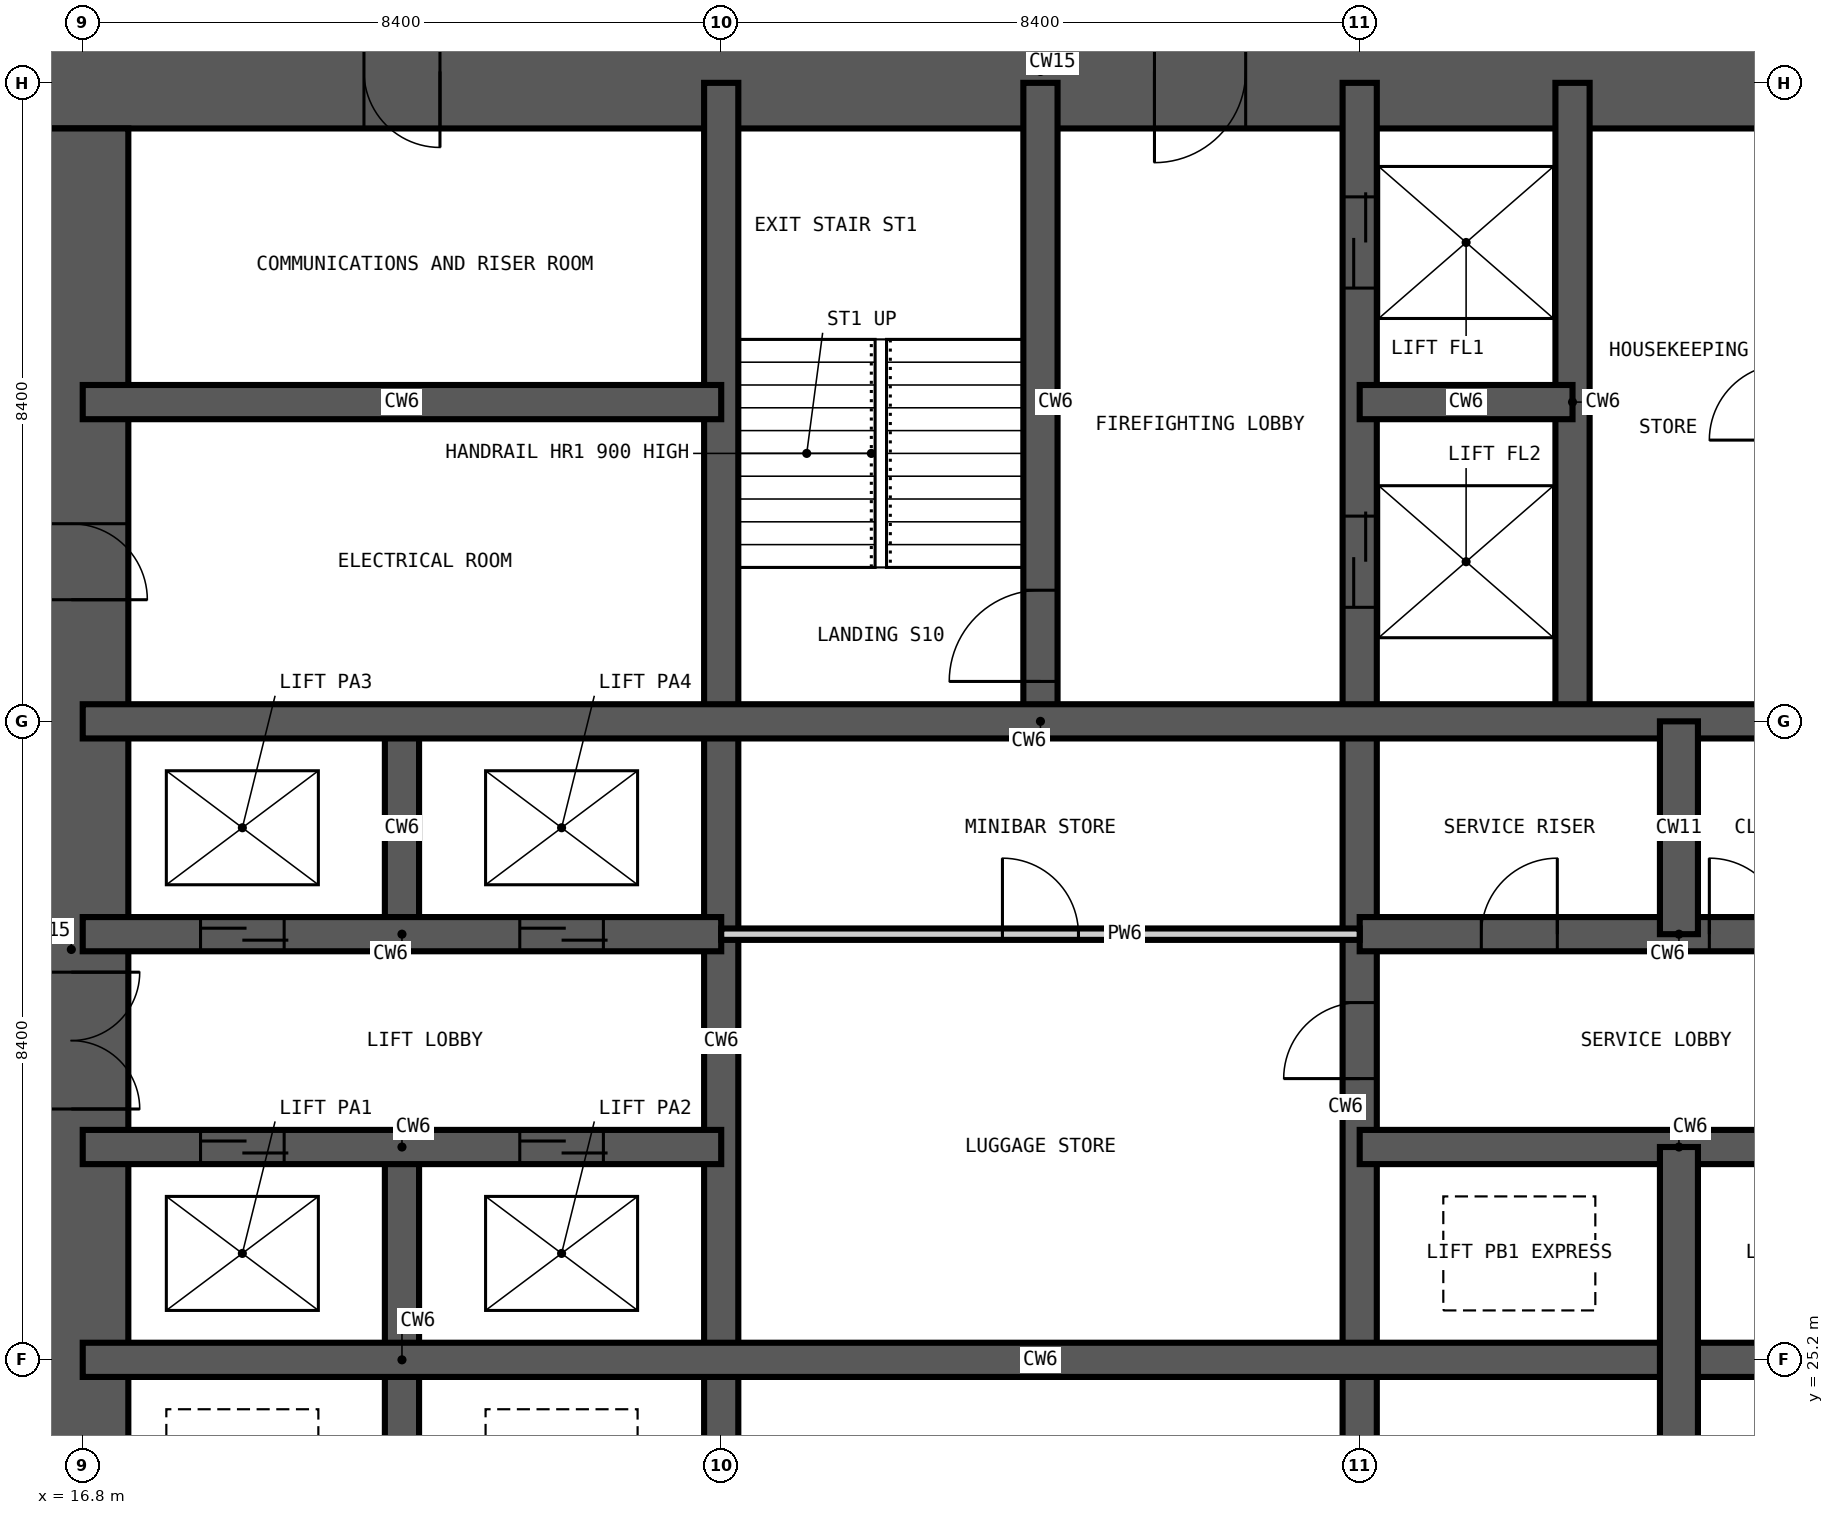
"""IFC4 building model, lengths in metres.
Left out: names, types, materials, properties, quantities, classifications, styles, units other than length and angle.
Written with IfcOpenShell. Run it as: python <this file> out.ifc"""

import sys

from ifc_helpers import new_model, si_unit, direction, frame, frame_2d, origin, place, context, subcontext, project, spatial, rectangle, extrude, element, fill, save


model = new_model("IFC4")
c1 = context("Model", 3, precision=1e-05, world=origin(), true_north=direction((0.0, 1.0)))
c2 = subcontext(c1, "Body", "Model", "MODEL_VIEW")
j1 = project(units=[si_unit("LENGTHUNIT", "METRE"), si_unit("PLANEANGLEUNIT", "RADIAN")], contexts=[c1])
p1 = place(None, origin())
s1 = spatial("IfcSite", under=j1, at=p1, CompositionType="ELEMENT")
p2 = place(p1, origin())
s2 = spatial("IfcBuilding", under=s1, at=p2, CompositionType="ELEMENT")
p3 = place(p2, frame((0.0, 0.0, 84.6)))
s3 = spatial("IfcBuildingStorey", under=s2, at=p3, CompositionType="ELEMENT", Elevation=84.6)
p4 = place(p3, frame((42.9, 42.15, -0.35), z_axis=(0.0, 0.0, 1.0), x_axis=(-1.0, 0.0, 0.0)))
e1 = element("IfcWall", 1, at=p4, inside=s3, PredefinedType="SHEAR", context=c2, shape_type="SweptSolid", body=[
    extrude(rectangle(XDim=27.0, YDim=1.5, at=frame_2d((13.5, 0.0))), origin(), (0.0, 0.0, 1.0), 3.55),
])
p5 = place(p4, frame((21.4, 0.0, 0.35)))
e2 = element("IfcOpeningElement", 2, at=p5, cuts=e1, PredefinedType="OPENING", context=c2, shape_type="SweptSolid", body=[
    extrude(rectangle(XDim=1.0, YDim=2.1, at=frame_2d((0.5, 1.05))), frame((0.0, 0.76, 0.0), z_axis=(0.0, -1.0, 0.0), x_axis=(1.0, 0.0, 0.0)), (0.0, 0.0, 1.0), 1.52),
])
p6 = place(p4, frame((10.8, 0.0, 0.35)))
e3 = element("IfcOpeningElement", 3, at=p6, cuts=e1, PredefinedType="OPENING", context=c2, shape_type="SweptSolid", body=[
    extrude(rectangle(XDim=1.2, YDim=2.2, at=frame_2d((0.6, 1.1))), frame((0.0, 0.76, 0.0), z_axis=(0.0, -1.0, 0.0), x_axis=(1.0, 0.0, 0.0)), (0.0, 0.0, 1.0), 1.52),
])
p7 = place(p3, frame((16.65, 41.4, -0.35), z_axis=(0.0, 0.0, 1.0), x_axis=(0.0, -1.0, 0.0)))
e4 = element("IfcWall", 4, at=p7, inside=s3, PredefinedType="SHEAR", context=c2, shape_type="SweptSolid", body=[
    extrude(rectangle(XDim=24.0, YDim=1.5, at=frame_2d((12.0, 0.0))), origin(), (0.0, 0.0, 1.0), 3.55),
])
p8 = place(p7, frame((11.1, 0.0, 0.35)))
e5 = element("IfcOpeningElement", 5, at=p8, cuts=e4, PredefinedType="OPENING", context=c2, shape_type="SweptSolid", body=[
    extrude(rectangle(XDim=1.8, YDim=2.2, at=frame_2d((0.9, 1.1))), frame((0.0, 0.76, 0.0), z_axis=(0.0, -1.0, 0.0), x_axis=(1.0, 0.0, 0.0)), (0.0, 0.0, 1.0), 1.52),
])
p9 = place(p7, frame((19.9, 0.0, 0.35)))
e6 = element("IfcOpeningElement", 6, at=p9, cuts=e4, PredefinedType="OPENING", context=c2, shape_type="SweptSolid", body=[
    extrude(rectangle(XDim=1.0, YDim=2.1, at=frame_2d((0.5, 1.05))), frame((0.0, 0.76, 0.0), z_axis=(0.0, -1.0, 0.0), x_axis=(1.0, 0.0, 0.0)), (0.0, 0.0, 1.0), 1.52),
])
p10 = place(p7, frame((5.2, 0.0, 0.35)))
e7 = element("IfcOpeningElement", 7, at=p10, cuts=e4, PredefinedType="OPENING", context=c2, shape_type="SweptSolid", body=[
    extrude(rectangle(XDim=1.0, YDim=2.1, at=frame_2d((0.5, 1.05))), frame((0.0, 0.76, 0.0), z_axis=(0.0, -1.0, 0.0), x_axis=(1.0, 0.0, 0.0)), (0.0, 0.0, 1.0), 1.52),
])
p11 = place(p3, frame((21.0, 22.4, -0.35), z_axis=(0.0, 0.0, 1.0), x_axis=(0.0, 1.0, 0.0)))
e8 = element("IfcWall", 8, at=p11, inside=s3, PredefinedType="SHEAR", context=c2, shape_type="SweptSolid", body=[
    extrude(rectangle(XDim=5.6, YDim=0.45, at=frame_2d((2.8, 0.0))), origin(), (0.0, 0.0, 1.0), 3.55),
])
p12 = place(p3, frame((21.0, 30.8, -0.35), z_axis=(0.0, 0.0, 1.0), x_axis=(0.0, 1.0, 0.0)))
e9 = element("IfcWall", 9, at=p12, inside=s3, PredefinedType="SHEAR", context=c2, shape_type="SweptSolid", body=[
    extrude(rectangle(XDim=2.8, YDim=0.45, at=frame_2d((1.4, 0.0))), origin(), (0.0, 0.0, 1.0), 3.55),
])
p13 = place(p3, frame((25.2, 16.8, -0.35), z_axis=(0.0, 0.0, 1.0), x_axis=(0.0, 1.0, 0.0)))
e10 = element("IfcWall", 10, at=p13, inside=s3, PredefinedType="SHEAR", context=c2, shape_type="SweptSolid", body=[
    extrude(rectangle(XDim=25.2, YDim=0.45, at=frame_2d((12.6, 0.0))), origin(), (0.0, 0.0, 1.0), 3.55),
])
p14 = place(p3, frame((29.4, 33.6, -0.35), z_axis=(0.0, 0.0, 1.0), x_axis=(0.0, 1.0, 0.0)))
e11 = element("IfcWall", 11, at=p14, inside=s3, PredefinedType="SHEAR", context=c2, shape_type="SweptSolid", body=[
    extrude(rectangle(XDim=8.4, YDim=0.45, at=frame_2d((4.2, 0.0))), origin(), (0.0, 0.0, 1.0), 3.55),
])
p15 = place(p14, frame((0.525, 0.0, 0.35)))
e12 = element("IfcOpeningElement", 12, at=p15, cuts=e11, PredefinedType="OPENING", context=c2, shape_type="SweptSolid", body=[
    extrude(rectangle(XDim=1.2, YDim=2.2, at=frame_2d((0.6, 1.1))), frame((0.0, 0.235, 0.0), z_axis=(0.0, -1.0, 0.0), x_axis=(1.0, 0.0, 0.0)), (0.0, 0.0, 1.0), 0.47),
])
p16 = place(p3, frame((33.6, 16.8, -0.35), z_axis=(0.0, 0.0, 1.0), x_axis=(0.0, 1.0, 0.0)))
e13 = element("IfcWall", 13, at=p16, inside=s3, PredefinedType="SHEAR", context=c2, shape_type="SweptSolid", body=[
    extrude(rectangle(XDim=25.2, YDim=0.45, at=frame_2d((12.6, 0.0))), origin(), (0.0, 0.0, 1.0), 3.55),
])
p17 = place(p16, frame((22.5, 0.0, 0.35)))
e14 = element("IfcOpeningElement", 14, at=p17, cuts=e13, PredefinedType="OPENING", context=c2, shape_type="SweptSolid", body=[
    extrude(rectangle(XDim=1.2, YDim=2.2, at=frame_2d((0.6, 1.1))), frame((0.0, 0.235, 0.0), z_axis=(0.0, -1.0, 0.0), x_axis=(1.0, 0.0, 0.0)), (0.0, 0.0, 1.0), 0.47),
])
p18 = place(p16, frame((18.3, 0.0, 0.35)))
e15 = element("IfcOpeningElement", 15, at=p18, cuts=e13, PredefinedType="OPENING", context=c2, shape_type="SweptSolid", body=[
    extrude(rectangle(XDim=1.2, YDim=2.2, at=frame_2d((0.6, 1.1))), frame((0.0, 0.235, 0.0), z_axis=(0.0, -1.0, 0.0), x_axis=(1.0, 0.0, 0.0)), (0.0, 0.0, 1.0), 0.47),
])
p19 = place(p16, frame((12.1, 0.0, 0.35)))
e16 = element("IfcOpeningElement", 16, at=p19, cuts=e13, PredefinedType="OPENING", context=c2, shape_type="SweptSolid", body=[
    extrude(rectangle(XDim=1.0, YDim=2.1, at=frame_2d((0.5, 1.05))), frame((0.0, 0.235, 0.0), z_axis=(0.0, -1.0, 0.0), x_axis=(1.0, 0.0, 0.0)), (0.0, 0.0, 1.0), 0.47),
])
p20 = place(p3, frame((36.4, 33.6, -0.35), z_axis=(0.0, 0.0, 1.0), x_axis=(0.0, 1.0, 0.0)))
e17 = element("IfcWall", 17, at=p20, inside=s3, PredefinedType="SHEAR", context=c2, shape_type="SweptSolid", body=[
    extrude(rectangle(XDim=8.4, YDim=0.45, at=frame_2d((4.2, 0.0))), origin(), (0.0, 0.0, 1.0), 3.55),
])
p21 = place(p3, frame((16.8, 25.2, -0.35), z_axis=(0.0, 0.0, 1.0), x_axis=(1.0, 0.0, 0.0)))
e18 = element("IfcWall", 18, at=p21, inside=s3, PredefinedType="SHEAR", context=c2, shape_type="SweptSolid", body=[
    extrude(rectangle(XDim=25.2, YDim=0.45, at=frame_2d((12.6, 0.0))), origin(), (0.0, 0.0, 1.0), 3.55),
])
p22 = place(p3, frame((16.8, 28.0, -0.35), z_axis=(0.0, 0.0, 1.0), x_axis=(1.0, 0.0, 0.0)))
e19 = element("IfcWall", 19, at=p22, inside=s3, PredefinedType="SHEAR", context=c2, shape_type="SweptSolid", body=[
    extrude(rectangle(XDim=8.4, YDim=0.45, at=frame_2d((4.2, 0.0))), origin(), (0.0, 0.0, 1.0), 3.55),
])
p23 = place(p22, frame((1.55, 0.0, 0.35)))
e20 = element("IfcOpeningElement", 20, at=p23, cuts=e19, PredefinedType="OPENING", context=c2, shape_type="SweptSolid", body=[
    extrude(rectangle(XDim=1.1, YDim=2.2, at=frame_2d((0.55, 1.1))), frame((0.0, 0.235, 0.0), z_axis=(0.0, -1.0, 0.0), x_axis=(1.0, 0.0, 0.0)), (0.0, 0.0, 1.0), 0.47),
])
p24 = place(p22, frame((5.75, 0.0, 0.35)))
e21 = element("IfcOpeningElement", 21, at=p24, cuts=e19, PredefinedType="OPENING", context=c2, shape_type="SweptSolid", body=[
    extrude(rectangle(XDim=1.1, YDim=2.2, at=frame_2d((0.55, 1.1))), frame((0.0, 0.235, 0.0), z_axis=(0.0, -1.0, 0.0), x_axis=(1.0, 0.0, 0.0)), (0.0, 0.0, 1.0), 0.47),
])
p25 = place(p3, frame((33.6, 28.0, -0.35), z_axis=(0.0, 0.0, 1.0), x_axis=(1.0, 0.0, 0.0)))
e22 = element("IfcWall", 22, at=p25, inside=s3, PredefinedType="SHEAR", context=c2, shape_type="SweptSolid", body=[
    extrude(rectangle(XDim=8.4, YDim=0.45, at=frame_2d((4.2, 0.0))), origin(), (0.0, 0.0, 1.0), 3.55),
])
p26 = place(p3, frame((16.8, 30.8, -0.35), z_axis=(0.0, 0.0, 1.0), x_axis=(1.0, 0.0, 0.0)))
e23 = element("IfcWall", 23, at=p26, inside=s3, PredefinedType="SHEAR", context=c2, shape_type="SweptSolid", body=[
    extrude(rectangle(XDim=8.4, YDim=0.45, at=frame_2d((4.2, 0.0))), origin(), (0.0, 0.0, 1.0), 3.55),
])
p27 = place(p26, frame((1.55, 0.0, 0.35)))
e24 = element("IfcOpeningElement", 24, at=p27, cuts=e23, PredefinedType="OPENING", context=c2, shape_type="SweptSolid", body=[
    extrude(rectangle(XDim=1.1, YDim=2.2, at=frame_2d((0.55, 1.1))), frame((0.0, 0.235, 0.0), z_axis=(0.0, -1.0, 0.0), x_axis=(1.0, 0.0, 0.0)), (0.0, 0.0, 1.0), 0.47),
])
p28 = place(p26, frame((5.75, 0.0, 0.35)))
e25 = element("IfcOpeningElement", 25, at=p28, cuts=e23, PredefinedType="OPENING", context=c2, shape_type="SweptSolid", body=[
    extrude(rectangle(XDim=1.1, YDim=2.2, at=frame_2d((0.55, 1.1))), frame((0.0, 0.235, 0.0), z_axis=(0.0, -1.0, 0.0), x_axis=(1.0, 0.0, 0.0)), (0.0, 0.0, 1.0), 0.47),
])
p29 = place(p3, frame((33.6, 30.8, -0.35), z_axis=(0.0, 0.0, 1.0), x_axis=(1.0, 0.0, 0.0)))
e26 = element("IfcWall", 26, at=p29, inside=s3, PredefinedType="SHEAR", context=c2, shape_type="SweptSolid", body=[
    extrude(rectangle(XDim=8.4, YDim=0.45, at=frame_2d((4.2, 0.0))), origin(), (0.0, 0.0, 1.0), 3.55),
])
p30 = place(p29, frame((1.6, 0.0, 0.35)))
e27 = element("IfcOpeningElement", 27, at=p30, cuts=e26, PredefinedType="OPENING", context=c2, shape_type="SweptSolid", body=[
    extrude(rectangle(XDim=1.0, YDim=2.1, at=frame_2d((0.5, 1.05))), frame((0.0, 0.235, 0.0), z_axis=(0.0, -1.0, 0.0), x_axis=(1.0, 0.0, 0.0)), (0.0, 0.0, 1.0), 0.47),
])
p31 = place(p29, frame((4.6, 0.0, 0.35)))
e28 = element("IfcOpeningElement", 28, at=p31, cuts=e26, PredefinedType="OPENING", context=c2, shape_type="SweptSolid", body=[
    extrude(rectangle(XDim=1.0, YDim=2.1, at=frame_2d((0.5, 1.05))), frame((0.0, 0.235, 0.0), z_axis=(0.0, -1.0, 0.0), x_axis=(1.0, 0.0, 0.0)), (0.0, 0.0, 1.0), 0.47),
])
p32 = place(p3, frame((16.8, 33.6, -0.35), z_axis=(0.0, 0.0, 1.0), x_axis=(1.0, 0.0, 0.0)))
e29 = element("IfcWall", 29, at=p32, inside=s3, PredefinedType="SHEAR", context=c2, shape_type="SweptSolid", body=[
    extrude(rectangle(XDim=25.2, YDim=0.45, at=frame_2d((12.6, 0.0))), origin(), (0.0, 0.0, 1.0), 3.55),
])
p33 = place(p3, frame((16.8, 37.8, -0.35), z_axis=(0.0, 0.0, 1.0), x_axis=(1.0, 0.0, 0.0)))
e30 = element("IfcWall", 30, at=p33, inside=s3, PredefinedType="SHEAR", context=c2, shape_type="SweptSolid", body=[
    extrude(rectangle(XDim=8.4, YDim=0.45, at=frame_2d((4.2, 0.0))), origin(), (0.0, 0.0, 1.0), 3.55),
])
p34 = place(p3, frame((33.6, 37.8, -0.35), z_axis=(0.0, 0.0, 1.0), x_axis=(1.0, 0.0, 0.0)))
e31 = element("IfcWall", 31, at=p34, inside=s3, PredefinedType="SHEAR", context=c2, shape_type="SweptSolid", body=[
    extrude(rectangle(XDim=2.8, YDim=0.45, at=frame_2d((1.4, 0.0))), origin(), (0.0, 0.0, 1.0), 3.55),
])
p35 = place(p3, frame((37.8, 16.8, -0.35), z_axis=(0.0, 0.0, 1.0), x_axis=(0.0, 1.0, 0.0)))
e32 = element("IfcWall", 32, at=p35, inside=s3, PredefinedType="SHEAR", context=c2, shape_type="SweptSolid", body=[
    extrude(rectangle(XDim=11.2, YDim=0.5, at=frame_2d((5.6, 0.0))), origin(), (0.0, 0.0, 1.0), 3.55),
])
p36 = place(p3, frame((37.8, 30.8, -0.35), z_axis=(0.0, 0.0, 1.0), x_axis=(0.0, 1.0, 0.0)))
e33 = element("IfcWall", 33, at=p36, inside=s3, PredefinedType="SHEAR", context=c2, shape_type="SweptSolid", body=[
    extrude(rectangle(XDim=2.8, YDim=0.5, at=frame_2d((1.4, 0.0))), origin(), (0.0, 0.0, 1.0), 3.55),
])
p37 = place(p3, frame((25.2, 30.8, 0.0), z_axis=(0.0, 0.0, 1.0), x_axis=(1.0, 0.0, 0.0)))
e34 = element("IfcWall", 34, at=p37, inside=s3, PredefinedType="PARTITIONING", context=c2, shape_type="SweptSolid", body=[
    extrude(rectangle(XDim=8.4, YDim=0.15, at=frame_2d((4.2, 0.0))), origin(), (0.0, 0.0, 1.0), 3.2),
])
p38 = place(p37, frame((3.7, 0.0, 0.0)))
e35 = element("IfcOpeningElement", 35, at=p38, cuts=e34, PredefinedType="OPENING", context=c2, shape_type="SweptSolid", body=[
    extrude(rectangle(XDim=1.0, YDim=2.1, at=frame_2d((0.5, 1.05))), frame((0.0, 0.085, 0.0), z_axis=(0.0, -1.0, 0.0), x_axis=(1.0, 0.0, 0.0)), (0.0, 0.0, 1.0), 0.17),
])
p39 = place(p15, origin())
e36 = element("IfcDoor", 36, at=p39, inside=s3, OperationType="SINGLE_SWING_LEFT", PredefinedType="DOOR", context=c2, shape_type="SweptSolid", body=[
    extrude(rectangle(XDim=1.2, YDim=2.2, at=frame_2d((0.6, 1.1))), frame((0.0, 0.025, 0.0), z_axis=(0.0, -1.0, 0.0), x_axis=(1.0, 0.0, 0.0)), (0.0, 0.0, 1.0), 0.05),
])
fill(e12, e36)
p40 = place(p23, origin())
e37 = element("IfcDoor", 37, at=p40, inside=s3, OperationType="DOUBLE_DOOR_SLIDING", PredefinedType="DOOR", context=c2, shape_type="SweptSolid", body=[
    extrude(rectangle(XDim=1.1, YDim=2.2, at=frame_2d((0.55, 1.1))), frame((0.0, 0.025, 0.0), z_axis=(0.0, -1.0, 0.0), x_axis=(1.0, 0.0, 0.0)), (0.0, 0.0, 1.0), 0.05),
])
fill(e20, e37)
p41 = place(p24, origin())
e38 = element("IfcDoor", 38, at=p41, inside=s3, OperationType="DOUBLE_DOOR_SLIDING", PredefinedType="DOOR", context=c2, shape_type="SweptSolid", body=[
    extrude(rectangle(XDim=1.1, YDim=2.2, at=frame_2d((0.55, 1.1))), frame((0.0, 0.025, 0.0), z_axis=(0.0, -1.0, 0.0), x_axis=(1.0, 0.0, 0.0)), (0.0, 0.0, 1.0), 0.05),
])
fill(e21, e38)
p42 = place(p27, origin())
e39 = element("IfcDoor", 39, at=p42, inside=s3, OperationType="DOUBLE_DOOR_SLIDING", PredefinedType="DOOR", context=c2, shape_type="SweptSolid", body=[
    extrude(rectangle(XDim=1.1, YDim=2.2, at=frame_2d((0.55, 1.1))), frame((0.0, 0.025, 0.0), z_axis=(0.0, -1.0, 0.0), x_axis=(1.0, 0.0, 0.0)), (0.0, 0.0, 1.0), 0.05),
])
fill(e24, e39)
p43 = place(p28, origin())
e40 = element("IfcDoor", 40, at=p43, inside=s3, OperationType="DOUBLE_DOOR_SLIDING", PredefinedType="DOOR", context=c2, shape_type="SweptSolid", body=[
    extrude(rectangle(XDim=1.1, YDim=2.2, at=frame_2d((0.55, 1.1))), frame((0.0, 0.025, 0.0), z_axis=(0.0, -1.0, 0.0), x_axis=(1.0, 0.0, 0.0)), (0.0, 0.0, 1.0), 0.05),
])
fill(e25, e40)
p44 = place(p17, origin())
e41 = element("IfcDoor", 41, at=p44, inside=s3, OperationType="DOUBLE_DOOR_SLIDING", PredefinedType="DOOR", context=c2, shape_type="SweptSolid", body=[
    extrude(rectangle(XDim=1.2, YDim=2.2, at=frame_2d((0.6, 1.1))), frame((0.0, 0.025, 0.0), z_axis=(0.0, -1.0, 0.0), x_axis=(1.0, 0.0, 0.0)), (0.0, 0.0, 1.0), 0.05),
])
fill(e14, e41)
p45 = place(p18, origin())
e42 = element("IfcDoor", 42, at=p45, inside=s3, OperationType="DOUBLE_DOOR_SLIDING", PredefinedType="DOOR", context=c2, shape_type="SweptSolid", body=[
    extrude(rectangle(XDim=1.2, YDim=2.2, at=frame_2d((0.6, 1.1))), frame((0.0, 0.025, 0.0), z_axis=(0.0, -1.0, 0.0), x_axis=(1.0, 0.0, 0.0)), (0.0, 0.0, 1.0), 0.05),
])
fill(e15, e42)
p46 = place(p8, origin())
e43 = element("IfcDoor", 43, at=p46, inside=s3, OperationType="DOUBLE_DOOR_DOUBLE_SWING", PredefinedType="DOOR", context=c2, shape_type="SweptSolid", body=[
    extrude(rectangle(XDim=1.8, YDim=2.2, at=frame_2d((0.9, 1.1))), frame((0.0, 0.025, 0.0), z_axis=(0.0, -1.0, 0.0), x_axis=(1.0, 0.0, 0.0)), (0.0, 0.0, 1.0), 0.05),
])
fill(e5, e43)
p47 = place(p10, origin())
e44 = element("IfcDoor", 44, at=p47, inside=s3, OperationType="SINGLE_SWING_RIGHT", PredefinedType="DOOR", context=c2, shape_type="SweptSolid", body=[
    extrude(rectangle(XDim=1.0, YDim=2.1, at=frame_2d((0.5, 1.05))), frame((0.0, 0.025, 0.0), z_axis=(0.0, -1.0, 0.0), x_axis=(1.0, 0.0, 0.0)), (0.0, 0.0, 1.0), 0.05),
])
fill(e7, e44)
p48 = place(p5, origin())
e45 = element("IfcDoor", 45, at=p48, inside=s3, OperationType="SINGLE_SWING_LEFT", PredefinedType="DOOR", context=c2, shape_type="SweptSolid", body=[
    extrude(rectangle(XDim=1.0, YDim=2.1, at=frame_2d((0.5, 1.05))), frame((0.0, 0.025, 0.0), z_axis=(0.0, -1.0, 0.0), x_axis=(1.0, 0.0, 0.0)), (0.0, 0.0, 1.0), 0.05),
])
fill(e2, e45)
p49 = place(p19, origin())
e46 = element("IfcDoor", 46, at=p49, inside=s3, OperationType="SINGLE_SWING_LEFT", PredefinedType="DOOR", context=c2, shape_type="SweptSolid", body=[
    extrude(rectangle(XDim=1.0, YDim=2.1, at=frame_2d((0.5, 1.05))), frame((0.0, 0.025, 0.0), z_axis=(0.0, -1.0, 0.0), x_axis=(1.0, 0.0, 0.0)), (0.0, 0.0, 1.0), 0.05),
])
fill(e16, e46)
p50 = place(p38, origin())
e47 = element("IfcDoor", 47, at=p50, inside=s3, OperationType="SINGLE_SWING_LEFT", PredefinedType="DOOR", context=c2, shape_type="SweptSolid", body=[
    extrude(rectangle(XDim=1.0, YDim=2.1, at=frame_2d((0.5, 1.05))), frame((0.0, 0.025, 0.0), z_axis=(0.0, -1.0, 0.0), x_axis=(1.0, 0.0, 0.0)), (0.0, 0.0, 1.0), 0.05),
])
fill(e35, e47)
p51 = place(p30, origin())
e48 = element("IfcDoor", 48, at=p51, inside=s3, OperationType="SINGLE_SWING_RIGHT", PredefinedType="DOOR", context=c2, shape_type="SweptSolid", body=[
    extrude(rectangle(XDim=1.0, YDim=2.1, at=frame_2d((0.5, 1.05))), frame((0.0, 0.025, 0.0), z_axis=(0.0, -1.0, 0.0), x_axis=(1.0, 0.0, 0.0)), (0.0, 0.0, 1.0), 0.05),
])
fill(e27, e48)
p52 = place(p31, origin())
e49 = element("IfcDoor", 49, at=p52, inside=s3, OperationType="SINGLE_SWING_LEFT", PredefinedType="DOOR", context=c2, shape_type="SweptSolid", body=[
    extrude(rectangle(XDim=1.0, YDim=2.1, at=frame_2d((0.5, 1.05))), frame((0.0, 0.025, 0.0), z_axis=(0.0, -1.0, 0.0), x_axis=(1.0, 0.0, 0.0)), (0.0, 0.0, 1.0), 0.05),
])
fill(e28, e49)
p53 = place(p6, origin())
e50 = element("IfcDoor", 50, at=p53, inside=s3, OperationType="SINGLE_SWING_RIGHT", PredefinedType="DOOR", context=c2, shape_type="SweptSolid", body=[
    extrude(rectangle(XDim=1.2, YDim=2.2, at=frame_2d((0.6, 1.1))), frame((0.0, 0.025, 0.0), z_axis=(0.0, -1.0, 0.0), x_axis=(1.0, 0.0, 0.0)), (0.0, 0.0, 1.0), 0.05),
])
fill(e3, e50)
save(model, sys.argv[1])
